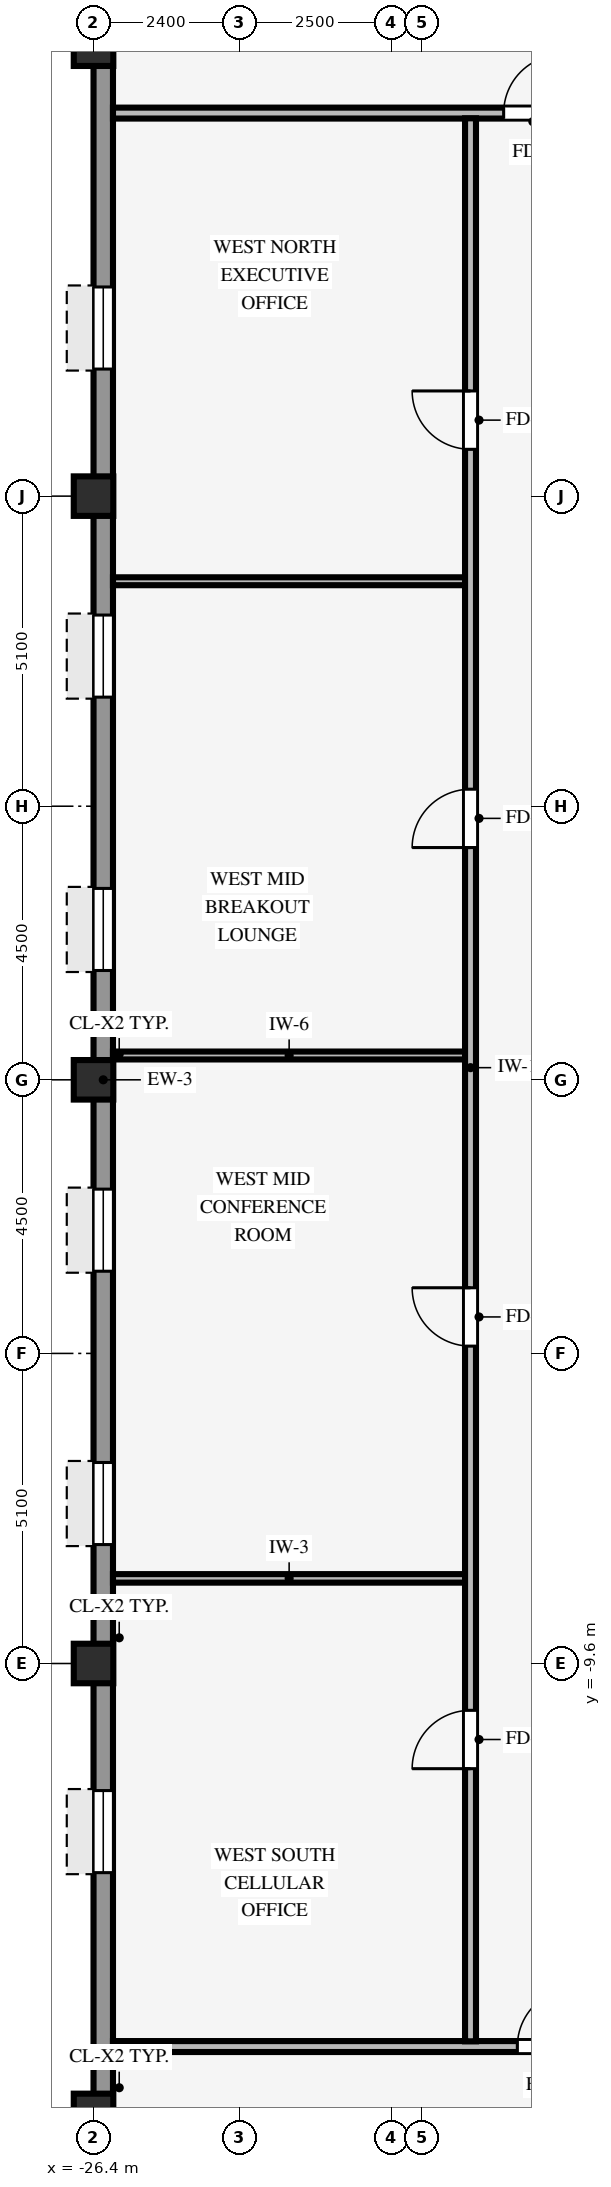
"""IFC4 building model, lengths in metres.
Left out: names, types, materials, properties, quantities, classifications, styles, units other than length and angle.
Written with IfcOpenShell. Run it as: python <this file> out.ifc"""

import sys

from ifc_helpers import new_model, si_unit, direction, frame, frame_2d, origin, origin_2d, place, context, subcontext, project, spatial, rectangle, hollow_rectangle, extrude, source, transform, mapped, element, fill, save


model = new_model("IFC4")
c1 = context("Model", 3, precision=1e-05, world=origin(), true_north=direction((0.0, 1.0)))
c2 = subcontext(c1, "Body", "Model", "MODEL_VIEW")
j1 = project(units=[si_unit("LENGTHUNIT", "METRE"), si_unit("PLANEANGLEUNIT", "RADIAN")], contexts=[c1])
p1 = place(None, origin())
s1 = spatial("IfcSite", under=j1, at=p1, CompositionType="ELEMENT")
p2 = place(p1, origin())
s2 = spatial("IfcBuilding", under=s1, at=p2, CompositionType="ELEMENT")
p3 = place(p2, frame((0.0, 0.0, 160.35)))
s3 = spatial("IfcBuildingStorey", under=s2, at=p3, CompositionType="ELEMENT", Elevation=160.35)
for number, where, z_axis, x_axis in (
    (1, (-26.4, -17.0, 0.0), (0.0, 0.0, 1.0), (1.0, 0.0, 0.0)),
    (2, (-26.4, -9.6, 0.0), (0.0, 0.0, 1.0), (1.0, 0.0, 0.0)),
    (3, (-26.4, 0.0, 0.0), (0.0, 0.0, 1.0), (1.0, 0.0, 0.0)),
    (4, (-26.4, 9.6, 0.0), (0.0, 0.0, 1.0), (1.0, 0.0, 0.0)),
    (5, (-26.4, 17.0, 0.0), (0.0, 0.0, 1.0), (1.0, 0.0, 0.0)),
):
    element("IfcColumn", number, at=place(p3, frame(where, z_axis=z_axis, x_axis=x_axis)), inside=s3, PredefinedType="COLUMN", context=c2, shape_type="SweptSolid", body=[
        extrude(hollow_rectangle(XDim=0.65, YDim=0.65, WallThickness=0.04, InnerFilletRadius=0.04, OuterFilletRadius=0.08, at=origin_2d()), origin(), (0.0, 0.0, 1.0), 3.37),
    ])
p4 = place(p3, frame((-26.24, -20.784, 0.0), z_axis=(0.0, 0.0, 1.0), x_axis=(0.0, 1.0, 0.0)))
e6 = element("IfcWall", 6, at=p4, inside=s3, PredefinedType="STANDARD", context=c2, shape_type="SweptSolid", body=[
    extrude(rectangle(XDim=41.568, YDim=0.32, at=frame_2d((20.784, 0.0))), origin(), (0.0, 0.0, 1.0), 2.705),
])
p5 = place(p4, frame((1.448, 0.0, 0.8)))
e7 = element("IfcOpeningElement", 7, at=p5, cuts=e6, PredefinedType="OPENING", context=c2, shape_type="SweptSolid", body=[
    extrude(rectangle(XDim=1.35, YDim=1.56, at=frame_2d((0.675, 0.78))), frame((0.0, 0.17, 0.0), z_axis=(0.0, -1.0, 0.0), x_axis=(1.0, 0.0, 0.0)), (0.0, 0.0, 1.0), 0.34),
])
p6 = place(p4, frame((7.744, 0.0, 0.8)))
e8 = element("IfcOpeningElement", 8, at=p6, cuts=e6, PredefinedType="OPENING", context=c2, shape_type="SweptSolid", body=[
    extrude(rectangle(XDim=1.35, YDim=1.56, at=frame_2d((0.675, 0.78))), frame((0.0, 0.17, 0.0), z_axis=(0.0, -1.0, 0.0), x_axis=(1.0, 0.0, 0.0)), (0.0, 0.0, 1.0), 0.34),
])
p7 = place(p4, frame((13.14, 0.0, 0.8)))
e9 = element("IfcOpeningElement", 9, at=p7, cuts=e6, PredefinedType="OPENING", context=c2, shape_type="SweptSolid", body=[
    extrude(rectangle(XDim=1.35, YDim=1.56, at=frame_2d((0.675, 0.78))), frame((0.0, 0.17, 0.0), z_axis=(0.0, -1.0, 0.0), x_axis=(1.0, 0.0, 0.0)), (0.0, 0.0, 1.0), 0.34),
])
p8 = place(p4, frame((17.636, 0.0, 0.8)))
e10 = element("IfcOpeningElement", 10, at=p8, cuts=e6, PredefinedType="OPENING", context=c2, shape_type="SweptSolid", body=[
    extrude(rectangle(XDim=1.35, YDim=1.56, at=frame_2d((0.675, 0.78))), frame((0.0, 0.17, 0.0), z_axis=(0.0, -1.0, 0.0), x_axis=(1.0, 0.0, 0.0)), (0.0, 0.0, 1.0), 0.34),
])
p9 = place(p4, frame((22.582, 0.0, 0.8)))
e11 = element("IfcOpeningElement", 11, at=p9, cuts=e6, PredefinedType="OPENING", context=c2, shape_type="SweptSolid", body=[
    extrude(rectangle(XDim=1.35, YDim=1.56, at=frame_2d((0.675, 0.78))), frame((0.0, 0.17, 0.0), z_axis=(0.0, -1.0, 0.0), x_axis=(1.0, 0.0, 0.0)), (0.0, 0.0, 1.0), 0.34),
])
p10 = place(p4, frame((27.078, 0.0, 0.8)))
e12 = element("IfcOpeningElement", 12, at=p10, cuts=e6, PredefinedType="OPENING", context=c2, shape_type="SweptSolid", body=[
    extrude(rectangle(XDim=1.35, YDim=1.56, at=frame_2d((0.675, 0.78))), frame((0.0, 0.17, 0.0), z_axis=(0.0, -1.0, 0.0), x_axis=(1.0, 0.0, 0.0)), (0.0, 0.0, 1.0), 0.34),
])
p11 = place(p4, frame((32.474, 0.0, 0.8)))
e13 = element("IfcOpeningElement", 13, at=p11, cuts=e6, PredefinedType="OPENING", context=c2, shape_type="SweptSolid", body=[
    extrude(rectangle(XDim=1.35, YDim=1.56, at=frame_2d((0.675, 0.78))), frame((0.0, 0.17, 0.0), z_axis=(0.0, -1.0, 0.0), x_axis=(1.0, 0.0, 0.0)), (0.0, 0.0, 1.0), 0.34),
])
p12 = place(p4, frame((38.77, 0.0, 0.8)))
e14 = element("IfcOpeningElement", 14, at=p12, cuts=e6, PredefinedType="OPENING", context=c2, shape_type="SweptSolid", body=[
    extrude(rectangle(XDim=1.35, YDim=1.56, at=frame_2d((0.675, 0.78))), frame((0.0, 0.17, 0.0), z_axis=(0.0, -1.0, 0.0), x_axis=(1.0, 0.0, 0.0)), (0.0, 0.0, 1.0), 0.34),
])
p13 = place(p3, frame((-26.08, -15.9, 0.0), z_axis=(0.0, 0.0, 1.0), x_axis=(1.0, 0.0, 0.0)))
e15 = element("IfcWall", 15, at=p13, inside=s3, PredefinedType="PARTITIONING", context=c2, shape_type="SweptSolid", body=[
    extrude(rectangle(XDim=52.16, YDim=0.18, at=frame_2d((26.08, 0.0))), origin(), (0.0, 0.0, 1.0), 3.36),
])
p14 = place(p13, frame((41.35, 0.0, 0.0)))
e16 = element("IfcOpeningElement", 16, at=p14, cuts=e15, PredefinedType="OPENING", context=c2, shape_type="SweptSolid", body=[
    extrude(rectangle(XDim=0.96, YDim=2.1, at=frame_2d((0.48, 1.05))), frame((0.0, 0.1, 0.0), z_axis=(0.0, -1.0, 0.0), x_axis=(1.0, 0.0, 0.0)), (0.0, 0.0, 1.0), 0.2),
])
p15 = place(p13, frame((23.34, 0.0, 0.0)))
e17 = element("IfcOpeningElement", 17, at=p15, cuts=e15, PredefinedType="OPENING", context=c2, shape_type="SweptSolid", body=[
    extrude(rectangle(XDim=0.96, YDim=2.1, at=frame_2d((0.48, 1.05))), frame((0.0, 0.1, 0.0), z_axis=(0.0, -1.0, 0.0), x_axis=(1.0, 0.0, 0.0)), (0.0, 0.0, 1.0), 0.2),
])
p16 = place(p13, frame((14.4, 0.0, 0.0)))
e18 = element("IfcOpeningElement", 18, at=p16, cuts=e15, PredefinedType="OPENING", context=c2, shape_type="SweptSolid", body=[
    extrude(rectangle(XDim=0.96, YDim=2.1, at=frame_2d((0.48, 1.05))), frame((0.0, 0.1, 0.0), z_axis=(0.0, -1.0, 0.0), x_axis=(1.0, 0.0, 0.0)), (0.0, 0.0, 1.0), 0.2),
])
p17 = place(p13, frame((30.005, 0.0, 0.0)))
e19 = element("IfcOpeningElement", 19, at=p17, cuts=e15, PredefinedType="OPENING", context=c2, shape_type="SweptSolid", body=[
    extrude(rectangle(XDim=0.96, YDim=2.1, at=frame_2d((0.48, 1.05))), frame((0.0, 0.1, 0.0), z_axis=(0.0, -1.0, 0.0), x_axis=(1.0, 0.0, 0.0)), (0.0, 0.0, 1.0), 0.2),
])
p18 = place(p13, frame((6.65, 0.0, 0.0)))
e20 = element("IfcOpeningElement", 20, at=p18, cuts=e15, PredefinedType="OPENING", context=c2, shape_type="SweptSolid", body=[
    extrude(rectangle(XDim=0.96, YDim=2.1, at=frame_2d((0.48, 1.05))), frame((0.0, 0.1, 0.0), z_axis=(0.0, -1.0, 0.0), x_axis=(1.0, 0.0, 0.0)), (0.0, 0.0, 1.0), 0.2),
])
p19 = place(p3, frame((-26.08, -8.2, 0.0), z_axis=(0.0, 0.0, 1.0), x_axis=(1.0, 0.0, 0.0)))
e21 = element("IfcWall", 21, at=p19, inside=s3, PredefinedType="PARTITIONING", context=c2, shape_type="SweptSolid", body=[
    extrude(rectangle(XDim=5.794, YDim=0.14, at=frame_2d((2.897, 0.0))), origin(), (0.0, 0.0, 1.0), 3.36),
])
p20 = place(p3, frame((-26.08, 0.4, 0.0), z_axis=(0.0, 0.0, 1.0), x_axis=(1.0, 0.0, 0.0)))
e22 = element("IfcWall", 22, at=p20, inside=s3, PredefinedType="PARTITIONING", context=c2, shape_type="SweptSolid", body=[
    extrude(rectangle(XDim=5.794, YDim=0.13, at=frame_2d((2.897, 0.0))), origin(), (0.0, 0.0, 1.0), 2.816),
])
p21 = place(p3, frame((-26.08, 8.2, 0.0), z_axis=(0.0, 0.0, 1.0), x_axis=(1.0, 0.0, 0.0)))
e23 = element("IfcWall", 23, at=p21, inside=s3, PredefinedType="PARTITIONING", context=c2, shape_type="SweptSolid", body=[
    extrude(rectangle(XDim=5.794, YDim=0.13, at=frame_2d((2.897, 0.0))), origin(), (0.0, 0.0, 1.0), 3.36),
])
p22 = place(p3, frame((-26.08, 15.9, 0.0), z_axis=(0.0, 0.0, 1.0), x_axis=(1.0, 0.0, 0.0)))
e24 = element("IfcWall", 24, at=p22, inside=s3, PredefinedType="PARTITIONING", context=c2, shape_type="SweptSolid", body=[
    extrude(rectangle(XDim=52.16, YDim=0.18, at=frame_2d((26.08, 0.0))), origin(), (0.0, 0.0, 1.0), 3.36),
])
p23 = place(p22, frame((24.5, 0.0, 0.0)))
e25 = element("IfcOpeningElement", 25, at=p23, cuts=e24, PredefinedType="OPENING", context=c2, shape_type="SweptSolid", body=[
    extrude(rectangle(XDim=0.96, YDim=2.1, at=frame_2d((0.48, 1.05))), frame((0.0, 0.1, 0.0), z_axis=(0.0, -1.0, 0.0), x_axis=(1.0, 0.0, 0.0)), (0.0, 0.0, 1.0), 0.2),
])
p24 = place(p22, frame((40.5, 0.0, 0.0)))
e26 = element("IfcOpeningElement", 26, at=p24, cuts=e24, PredefinedType="OPENING", context=c2, shape_type="SweptSolid", body=[
    extrude(rectangle(XDim=0.96, YDim=2.1, at=frame_2d((0.48, 1.05))), frame((0.0, 0.1, 0.0), z_axis=(0.0, -1.0, 0.0), x_axis=(1.0, 0.0, 0.0)), (0.0, 0.0, 1.0), 0.2),
])
p25 = place(p22, frame((13.16, 0.0, 0.0)))
e27 = element("IfcOpeningElement", 27, at=p25, cuts=e24, PredefinedType="OPENING", context=c2, shape_type="SweptSolid", body=[
    extrude(rectangle(XDim=0.96, YDim=2.1, at=frame_2d((0.48, 1.05))), frame((0.0, 0.1, 0.0), z_axis=(0.0, -1.0, 0.0), x_axis=(1.0, 0.0, 0.0)), (0.0, 0.0, 1.0), 0.2),
])
p26 = place(p22, frame((6.425, 0.0, 0.0)))
e28 = element("IfcOpeningElement", 28, at=p26, cuts=e24, PredefinedType="OPENING", context=c2, shape_type="SweptSolid", body=[
    extrude(rectangle(XDim=0.96, YDim=2.1, at=frame_2d((0.48, 1.05))), frame((0.0, 0.1, 0.0), z_axis=(0.0, -1.0, 0.0), x_axis=(1.0, 0.0, 0.0)), (0.0, 0.0, 1.0), 0.2),
])
p27 = place(p3, frame((-20.2, -15.814, 0.0), z_axis=(0.0, 0.0, 1.0), x_axis=(0.0, 1.0, 0.0)))
e29 = element("IfcWall", 29, at=p27, inside=s3, PredefinedType="PARTITIONING", context=c2, shape_type="SweptSolid", body=[
    extrude(rectangle(XDim=31.628, YDim=0.18, at=frame_2d((15.814, 0.0))), origin(), (0.0, 0.0, 1.0), 3.36),
])
p28 = place(p27, frame((11.434, 0.0, 0.0)))
e30 = element("IfcOpeningElement", 30, at=p28, cuts=e29, PredefinedType="OPENING", context=c2, shape_type="SweptSolid", body=[
    extrude(rectangle(XDim=0.96, YDim=2.1, at=frame_2d((0.48, 1.05))), frame((0.0, 0.1, 0.0), z_axis=(0.0, -1.0, 0.0), x_axis=(1.0, 0.0, 0.0)), (0.0, 0.0, 1.0), 0.2),
])
p29 = place(p27, frame((19.634, 0.0, 0.0)))
e31 = element("IfcOpeningElement", 31, at=p29, cuts=e29, PredefinedType="OPENING", context=c2, shape_type="SweptSolid", body=[
    extrude(rectangle(XDim=0.96, YDim=2.1, at=frame_2d((0.48, 1.05))), frame((0.0, 0.1, 0.0), z_axis=(0.0, -1.0, 0.0), x_axis=(1.0, 0.0, 0.0)), (0.0, 0.0, 1.0), 0.2),
])
p30 = place(p27, frame((4.484, 0.0, 0.0)))
e32 = element("IfcOpeningElement", 32, at=p30, cuts=e29, PredefinedType="OPENING", context=c2, shape_type="SweptSolid", body=[
    extrude(rectangle(XDim=0.96, YDim=2.1, at=frame_2d((0.48, 1.05))), frame((0.0, 0.1, 0.0), z_axis=(0.0, -1.0, 0.0), x_axis=(1.0, 0.0, 0.0)), (0.0, 0.0, 1.0), 0.2),
])
p31 = place(p27, frame((26.184, 0.0, 0.0)))
e33 = element("IfcOpeningElement", 33, at=p31, cuts=e29, PredefinedType="OPENING", context=c2, shape_type="SweptSolid", body=[
    extrude(rectangle(XDim=0.96, YDim=2.1, at=frame_2d((0.48, 1.05))), frame((0.0, 0.1, 0.0), z_axis=(0.0, -1.0, 0.0), x_axis=(1.0, 0.0, 0.0)), (0.0, 0.0, 1.0), 0.2),
])
m1 = source(origin(), c2, "Body", "SweptSolid", [
    extrude(rectangle(XDim=1.35, YDim=1.56, at=frame_2d((0.675, 0.78))), frame((0.0, 0.03, 0.0), z_axis=(0.0, -1.0, 0.0), x_axis=(1.0, 0.0, 0.0)), (0.0, 0.0, 1.0), 0.06),
])
p32 = place(p6, origin())
e34 = element("IfcWindow", 34, at=p32, inside=s3, PartitioningType="SINGLE_PANEL", PredefinedType="WINDOW", context=c2, shape_type="MappedRepresentation", body=[
    mapped(m1, transform((0.0, 0.0, 0.0), scale=1.0)),
])
fill(e8, e34)
p33 = place(p7, origin())
e35 = element("IfcWindow", 35, at=p33, inside=s3, PartitioningType="SINGLE_PANEL", PredefinedType="WINDOW", context=c2, shape_type="MappedRepresentation", body=[
    mapped(m1, transform((0.0, 0.0, 0.0), scale=1.0)),
])
fill(e9, e35)
p34 = place(p8, origin())
e36 = element("IfcWindow", 36, at=p34, inside=s3, PartitioningType="SINGLE_PANEL", PredefinedType="WINDOW", context=c2, shape_type="MappedRepresentation", body=[
    mapped(m1, transform((0.0, 0.0, 0.0), scale=1.0)),
])
fill(e10, e36)
p35 = place(p9, origin())
e37 = element("IfcWindow", 37, at=p35, inside=s3, PartitioningType="SINGLE_PANEL", PredefinedType="WINDOW", context=c2, shape_type="MappedRepresentation", body=[
    mapped(m1, transform((0.0, 0.0, 0.0), scale=1.0)),
])
fill(e11, e37)
p36 = place(p10, origin())
e38 = element("IfcWindow", 38, at=p36, inside=s3, PartitioningType="SINGLE_PANEL", PredefinedType="WINDOW", context=c2, shape_type="MappedRepresentation", body=[
    mapped(m1, transform((0.0, 0.0, 0.0), scale=1.0)),
])
fill(e12, e38)
p37 = place(p11, origin())
e39 = element("IfcWindow", 39, at=p37, inside=s3, PartitioningType="SINGLE_PANEL", PredefinedType="WINDOW", context=c2, shape_type="MappedRepresentation", body=[
    mapped(m1, transform((0.0, 0.0, 0.0), scale=1.0)),
])
fill(e13, e39)
m2 = source(origin(), c2, "Body", "SweptSolid", [
    extrude(rectangle(XDim=0.96, YDim=2.1, at=frame_2d((0.48, 1.05))), frame((0.0, 0.025, 0.0), z_axis=(0.0, -1.0, 0.0), x_axis=(1.0, 0.0, 0.0)), (0.0, 0.0, 1.0), 0.05),
])
p38 = place(p28, origin())
e40 = element("IfcDoor", 40, at=p38, inside=s3, OperationType="SINGLE_SWING_RIGHT", PredefinedType="DOOR", context=c2, shape_type="MappedRepresentation", body=[
    mapped(m2, transform((0.0, 0.0, 0.0), scale=1.0)),
])
fill(e30, e40)
p39 = place(p29, origin())
e41 = element("IfcDoor", 41, at=p39, inside=s3, OperationType="SINGLE_SWING_LEFT", PredefinedType="DOOR", context=c2, shape_type="MappedRepresentation", body=[
    mapped(m2, transform((0.0, 0.0, 0.0), scale=1.0)),
])
fill(e31, e41)
p40 = place(p30, origin())
e42 = element("IfcDoor", 42, at=p40, inside=s3, OperationType="SINGLE_SWING_LEFT", PredefinedType="DOOR", context=c2, shape_type="MappedRepresentation", body=[
    mapped(m2, transform((0.0, 0.0, 0.0), scale=1.0)),
])
fill(e32, e42)
p41 = place(p31, origin())
e43 = element("IfcDoor", 43, at=p41, inside=s3, OperationType="SINGLE_SWING_RIGHT", PredefinedType="DOOR", context=c2, shape_type="MappedRepresentation", body=[
    mapped(m2, transform((0.0, 0.0, 0.0), scale=1.0)),
])
fill(e33, e43)
p42 = place(p18, origin())
e44 = element("IfcDoor", 44, at=p42, inside=s3, OperationType="SINGLE_SWING_RIGHT", PredefinedType="DOOR", context=c2, shape_type="MappedRepresentation", body=[
    mapped(m2, transform((0.0, 0.0, 0.0), scale=1.0)),
])
fill(e20, e44)
p43 = place(p26, origin())
e45 = element("IfcDoor", 45, at=p43, inside=s3, OperationType="SINGLE_SWING_RIGHT", PredefinedType="DOOR", context=c2, shape_type="MappedRepresentation", body=[
    mapped(m2, transform((0.0, 0.0, 0.0), scale=1.0)),
])
fill(e28, e45)
save(model, sys.argv[1])
